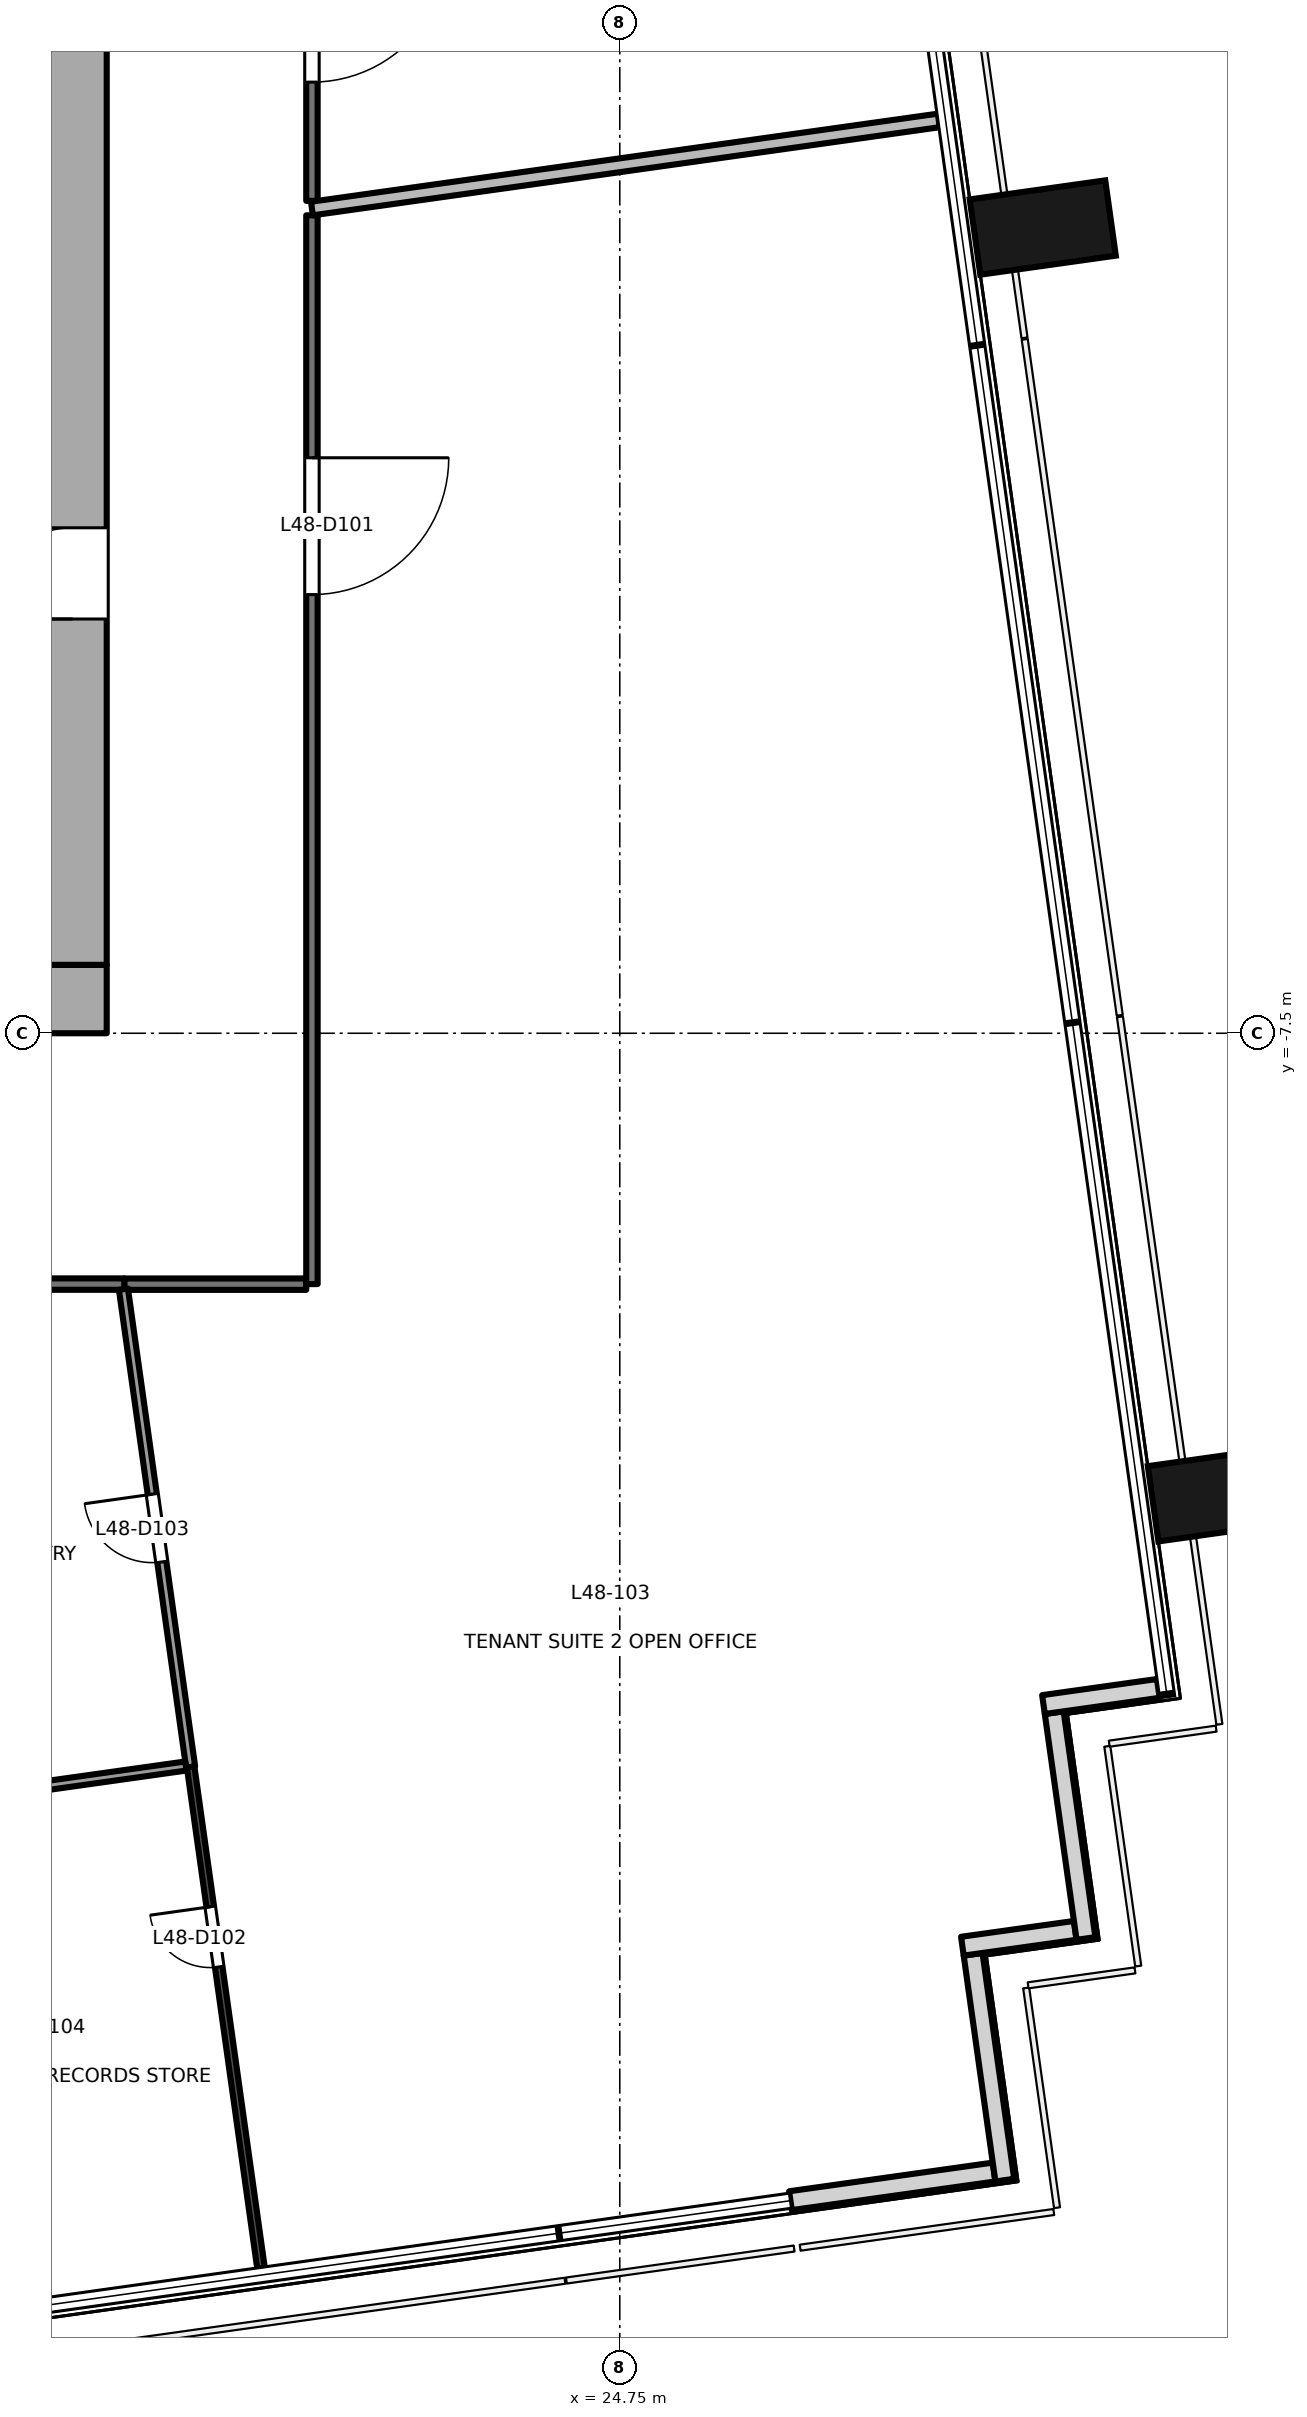
"""IFC4 building model, lengths in metres.
Left out: names, types, materials, properties, quantities, classifications, styles, units other than length and angle.
Written with IfcOpenShell. Run it as: python <this file> out.ifc"""

import sys

from ifc_helpers import new_model, si_unit, direction, frame, frame_2d, origin, origin_2d, place, context, subcontext, project, spatial, rectangle, extrude, element, fill, save


model = new_model("IFC4")
c1 = context("Model", 3, precision=1e-05, world=origin(), true_north=direction((0.0, 1.0)))
c2 = subcontext(c1, "Body", "Model", "MODEL_VIEW")
j1 = project(units=[si_unit("LENGTHUNIT", "METRE"), si_unit("PLANEANGLEUNIT", "RADIAN")], contexts=[c1])
p1 = place(None, origin())
s1 = spatial("IfcSite", under=j1, at=p1, CompositionType="ELEMENT")
p2 = place(p1, origin())
s2 = spatial("IfcBuilding", under=s1, at=p2, CompositionType="ELEMENT")
p3 = place(p2, frame((0.0, 0.0, 213.5)))
s3 = spatial("IfcBuildingStorey", under=s2, at=p3, CompositionType="ELEMENT", Elevation=213.5)
for number, where, z_axis, x_axis in (
    (1, (32.658, -13.565, -0.2), (0.0, 0.0, 1.0), (-0.139, 0.99, 0.0)),
    (2, (30.315, 3.1, -0.2), (0.0, 0.0, 1.0), (-0.139, 0.99, 0.0)),
):
    element("IfcColumn", number, at=place(p3, frame(where, z_axis=z_axis, x_axis=x_axis)), inside=s3, PredefinedType="COLUMN", context=c2, shape_type="SweptSolid", body=[
        extrude(rectangle(XDim=1.0, YDim=1.8, at=origin_2d()), origin(), (0.0, 0.0, 1.0), 3.9),
    ])
p4 = place(p3, frame((26.995, -22.859, 0.0), z_axis=(0.0, 0.0, 1.0), x_axis=(0.99024510326, 0.139336411139, 0.0)))
e3 = element("IfcWall", 3, at=p4, inside=s3, PredefinedType="SOLIDWALL", context=c2, shape_type="SweptSolid", body=[
    extrude(rectangle(XDim=2.705, YDim=0.25, at=frame_2d((1.353, 0.0))), origin(), (0.0, 0.0, 1.0), 3.7),
])
p5 = place(p3, frame((29.815, -22.588, 0.0), z_axis=(0.0, 0.0, 1.0), x_axis=(-0.138983028379, 0.9902947631, 0.0)))
e4 = element("IfcWall", 4, at=p5, inside=s3, PredefinedType="SOLIDWALL", context=c2, shape_type="SweptSolid", body=[
    extrude(rectangle(XDim=3.0, YDim=0.25, at=frame_2d((1.5, 0.0))), origin(), (0.0, 0.0, 1.0), 3.7),
])
p6 = place(p3, frame((29.257, -19.51, 0.0), z_axis=(0.0, 0.0, 1.0), x_axis=(0.990330117064, 0.138730887823, 0.0)))
e5 = element("IfcWall", 5, at=p6, inside=s3, PredefinedType="SOLIDWALL", context=c2, shape_type="SweptSolid", body=[
    extrude(rectangle(XDim=1.499, YDim=0.25, at=frame_2d((0.75, 0.0))), origin(), (0.0, 0.0, 1.0), 3.7),
])
p7 = place(p3, frame((30.883, -19.409, 0.0), z_axis=(0.0, 0.0, 1.0), x_axis=(-0.139324658755, 0.990246756855, 0.0)))
e6 = element("IfcWall", 6, at=p7, inside=s3, PredefinedType="SOLIDWALL", context=c2, shape_type="SweptSolid", body=[
    extrude(rectangle(XDim=3.0, YDim=0.25, at=frame_2d((1.5, 0.0))), origin(), (0.0, 0.0, 1.0), 3.7),
])
p8 = place(p3, frame((30.324, -16.332, 0.0), z_axis=(0.0, 0.0, 1.0), x_axis=(0.990238641016, 0.139382329723, 0.0)))
e7 = element("IfcWall", 7, at=p8, inside=s3, PredefinedType="SOLIDWALL", context=c2, shape_type="SweptSolid", body=[
    extrude(rectangle(XDim=1.526, YDim=0.25, at=frame_2d((0.763, 0.0))), origin(), (0.0, 0.0, 1.0), 3.7),
])
p9 = place(p3, frame((-18.0, -7.05, -0.2), z_axis=(0.0, 0.0, 1.0), x_axis=(1.0, 0.0, 0.0)))
e8 = element("IfcWall", 8, at=p9, inside=s3, PredefinedType="SHEAR", context=c2, shape_type="SweptSolid", body=[
    extrude(rectangle(XDim=36.0, YDim=0.9, at=frame_2d((18.0, 0.0))), origin(), (0.0, 0.0, 1.0), 3.9),
])
p10 = place(p9, frame((4.9, 0.0, 0.2)))
e9 = element("IfcOpeningElement", 9, at=p10, cuts=e8, PredefinedType="OPENING", context=c2, shape_type="SweptSolid", body=[
    extrude(rectangle(XDim=1.8, YDim=2.1, at=frame_2d((0.9, 1.05))), frame((0.0, 0.46, 0.0), z_axis=(0.0, -1.0, 0.0), x_axis=(1.0, 0.0, 0.0)), (0.0, 0.0, 1.0), 0.921),
])
p11 = place(p9, frame((16.8, 0.0, 0.2)))
e10 = element("IfcOpeningElement", 10, at=p11, cuts=e8, PredefinedType="OPENING", context=c2, shape_type="SweptSolid", body=[
    extrude(rectangle(XDim=2.4, YDim=2.1, at=frame_2d((1.2, 1.05))), frame((0.0, 0.46, 0.0), z_axis=(0.0, -1.0, 0.0), x_axis=(1.0, 0.0, 0.0)), (0.0, 0.0, 1.0), 0.921),
])
p12 = place(p9, frame((26.1, 0.0, 0.2)))
e11 = element("IfcOpeningElement", 11, at=p12, cuts=e8, PredefinedType="OPENING", context=c2, shape_type="SweptSolid", body=[
    extrude(rectangle(XDim=2.4, YDim=2.1, at=frame_2d((1.2, 1.05))), frame((0.0, 0.46, 0.0), z_axis=(0.0, -1.0, 0.0), x_axis=(1.0, 0.0, 0.0)), (0.0, 0.0, 1.0), 0.921),
])
p13 = place(p3, frame((17.55, -6.6, -0.2), z_axis=(0.0, 0.0, 1.0), x_axis=(0.0, 1.0, 0.0)))
e12 = element("IfcWall", 12, at=p13, inside=s3, PredefinedType="SHEAR", context=c2, shape_type="SweptSolid", body=[
    extrude(rectangle(XDim=13.2, YDim=0.9, at=frame_2d((6.6, 0.0))), origin(), (0.0, 0.0, 1.0), 3.9),
])
p14 = place(p13, frame((4.55, 0.0, 0.2)))
e13 = element("IfcOpeningElement", 13, at=p14, cuts=e12, PredefinedType="OPENING", context=c2, shape_type="SweptSolid", body=[
    extrude(rectangle(XDim=1.2, YDim=2.1, at=frame_2d((0.6, 1.05))), frame((0.0, 0.46, 0.0), z_axis=(0.0, -1.0, 0.0), x_axis=(1.0, 0.0, 0.0)), (0.0, 0.0, 1.0), 0.921),
])
p15 = place(p3, frame((20.625, -10.801, 0.0), z_axis=(0.0, 0.0, 1.0), x_axis=(-1.0, 0.0, 0.0)))
e14 = element("IfcWall", 14, at=p15, inside=s3, PredefinedType="PARTITIONING", context=c2, shape_type="SweptSolid", body=[
    extrude(rectangle(XDim=2.394, YDim=0.15, at=frame_2d((1.197, 0.0))), origin(), (0.0, 0.0, 1.0), 3.7),
])
p16 = place(p3, frame((20.7, 3.261, 0.0), z_axis=(0.0, 0.0, 1.0), x_axis=(0.0, -1.0, 0.0)))
e15 = element("IfcWall", 15, at=p16, inside=s3, PredefinedType="PARTITIONING", context=c2, shape_type="SweptSolid", body=[
    extrude(rectangle(XDim=14.061, YDim=0.15, at=frame_2d((7.031, 0.0))), origin(), (0.0, 0.0, 1.0), 3.1),
])
p17 = place(p16, frame((3.19, 0.0, 0.0)))
e16 = element("IfcOpeningElement", 16, at=p17, cuts=e15, PredefinedType="OPENING", context=c2, shape_type="SweptSolid", body=[
    extrude(rectangle(XDim=1.8, YDim=2.1, at=frame_2d((0.9, 1.05))), frame((0.0, 0.085, 0.0), z_axis=(0.0, -1.0, 0.0), x_axis=(1.0, 0.0, 0.0)), (0.0, 0.0, 1.0), 0.171),
])
p18 = place(p3, frame((18.231, -10.8, 0.0), z_axis=(0.0, 0.0, 1.0), x_axis=(-1.0, 0.0, 0.0)))
e17 = element("IfcWall", 17, at=p18, inside=s3, PredefinedType="PARTITIONING", context=c2, shape_type="SweptSolid", body=[
    extrude(rectangle(XDim=4.782, YDim=0.15, at=frame_2d((2.391, 0.0))), origin(), (0.0, 0.0, 1.0), 2.9),
])
p19 = place(p3, frame((20.7, 7.5, 0.0), z_axis=(0.0, 0.0, 1.0), x_axis=(0.0, -1.0, 0.0)))
e18 = element("IfcWall", 18, at=p19, inside=s3, PredefinedType="PARTITIONING", context=c2, shape_type="SweptSolid", body=[
    extrude(rectangle(XDim=4.049, YDim=0.15, at=frame_2d((2.024, 0.0))), origin(), (0.0, 0.0, 1.0), 3.15),
])
p20 = place(p19, frame((0.687, 0.0, 0.0)))
e19 = element("IfcOpeningElement", 19, at=p20, cuts=e18, PredefinedType="OPENING", context=c2, shape_type="SweptSolid", body=[
    extrude(rectangle(XDim=1.8, YDim=2.1, at=frame_2d((0.9, 1.05))), frame((0.0, 0.085, 0.0), z_axis=(0.0, -1.0, 0.0), x_axis=(1.0, 0.0, 0.0)), (0.0, 0.0, 1.0), 0.171),
])
p21 = place(p3, frame((20.03, -23.746, 0.0), z_axis=(0.0, 0.0, 1.0), x_axis=(-0.139070003418, 0.990282552683, 0.0)))
e20 = element("IfcWall", 20, at=p21, inside=s3, PredefinedType="PARTITIONING", context=c2, shape_type="SweptSolid", body=[
    extrude(rectangle(XDim=6.659, YDim=0.1, at=frame_2d((3.329, 0.0))), origin(), (0.0, 0.0, 1.0), 3.7),
])
p22 = place(p21, frame((4.001, 0.0, 0.0)))
e21 = element("IfcOpeningElement", 21, at=p22, cuts=e20, PredefinedType="OPENING", context=c2, shape_type="SweptSolid", body=[
    extrude(rectangle(XDim=0.8, YDim=2.1, at=frame_2d((0.4, 1.05))), frame((0.0, 0.061, 0.0), z_axis=(0.0, -1.0, 0.0), x_axis=(1.0, 0.0, 0.0)), (0.0, 0.0, 1.0), 0.121),
])
p23 = place(p3, frame((19.104, -17.152, 0.0), z_axis=(0.0, 0.0, 1.0), x_axis=(-0.139283120935, 0.99025260021, 0.0)))
e22 = element("IfcWall", 22, at=p23, inside=s3, PredefinedType="PARTITIONING", context=c2, shape_type="SweptSolid", body=[
    extrude(rectangle(XDim=6.347, YDim=0.12, at=frame_2d((3.173, 0.0))), origin(), (0.0, 0.0, 1.0), 3.7),
])
p24 = place(p23, frame((2.723, 0.0, 0.0)))
e23 = element("IfcOpeningElement", 23, at=p24, cuts=e22, PredefinedType="OPENING", context=c2, shape_type="SweptSolid", body=[
    extrude(rectangle(XDim=0.9, YDim=2.1, at=frame_2d((0.45, 1.05))), frame((0.0, 0.071, 0.0), z_axis=(0.0, -1.0, 0.0), x_axis=(1.0, 0.0, 0.0)), (0.0, 0.0, 1.0), 0.141),
])
p25 = place(p3, frame((20.7, 3.35, 0.0), z_axis=(0.0, 0.0, 1.0), x_axis=(0.990269965101, 0.139159606996, 0.0)))
e24 = element("IfcWall", 24, at=p25, inside=s3, PredefinedType="PARTITIONING", context=c2, shape_type="SweptSolid", body=[
    extrude(rectangle(XDim=8.328, YDim=0.18, at=frame_2d((4.164, 0.0))), origin(), (0.0, 0.0, 1.0), 3.15),
])
p26 = place(p3, frame((14.421, -17.79, 0.0), z_axis=(0.0, 0.0, 1.0), x_axis=(0.990243495755, 0.139347834982, 0.0)))
e25 = element("IfcWall", 25, at=p26, inside=s3, PredefinedType="PARTITIONING", context=c2, shape_type="SweptSolid", body=[
    extrude(rectangle(XDim=4.666, YDim=0.12, at=frame_2d((2.333, 0.0))), origin(), (0.0, 0.0, 1.0), 3.7),
])
p27 = place(p14, origin())
e26 = element("IfcDoor", 26, at=p27, inside=s3, OperationType="SINGLE_SWING_LEFT", PredefinedType="DOOR", context=c2, shape_type="SweptSolid", body=[
    extrude(rectangle(XDim=1.2, YDim=2.1, at=frame_2d((0.6, 1.05))), frame((0.0, 0.025, 0.0), z_axis=(0.0, -1.0, 0.0), x_axis=(1.0, 0.0, 0.0)), (0.0, 0.0, 1.0), 0.05),
])
fill(e13, e26)
p28 = place(p17, origin())
e27 = element("IfcDoor", 27, at=p28, inside=s3, OperationType="DOUBLE_DOOR_SINGLE_SWING", PredefinedType="DOOR", context=c2, shape_type="SweptSolid", body=[
    extrude(rectangle(XDim=1.8, YDim=2.1, at=frame_2d((0.9, 1.05))), frame((0.0, 0.025, 0.0), z_axis=(0.0, -1.0, 0.0), x_axis=(1.0, 0.0, 0.0)), (0.0, 0.0, 1.0), 0.05),
])
fill(e16, e27)
p29 = place(p22, origin())
e28 = element("IfcDoor", 28, at=p29, inside=s3, OperationType="SINGLE_SWING_RIGHT", PredefinedType="DOOR", context=c2, shape_type="SweptSolid", body=[
    extrude(rectangle(XDim=0.8, YDim=2.1, at=frame_2d((0.4, 1.05))), frame((0.0, 0.025, 0.0), z_axis=(0.0, -1.0, 0.0), x_axis=(1.0, 0.0, 0.0)), (0.0, 0.0, 1.0), 0.05),
])
fill(e21, e28)
p30 = place(p24, origin())
e29 = element("IfcDoor", 29, at=p30, inside=s3, OperationType="SINGLE_SWING_RIGHT", PredefinedType="DOOR", context=c2, shape_type="SweptSolid", body=[
    extrude(rectangle(XDim=0.9, YDim=2.1, at=frame_2d((0.45, 1.05))), frame((0.0, 0.025, 0.0), z_axis=(0.0, -1.0, 0.0), x_axis=(1.0, 0.0, 0.0)), (0.0, 0.0, 1.0), 0.05),
])
fill(e23, e29)
p31 = place(p20, origin())
e30 = element("IfcDoor", 30, at=p31, inside=s3, OperationType="DOUBLE_DOOR_SINGLE_SWING", PredefinedType="DOOR", context=c2, shape_type="SweptSolid", body=[
    extrude(rectangle(XDim=1.8, YDim=2.1, at=frame_2d((0.9, 1.05))), frame((0.0, 0.025, 0.0), z_axis=(0.0, -1.0, 0.0), x_axis=(1.0, 0.0, 0.0)), (0.0, 0.0, 1.0), 0.05),
])
fill(e19, e30)
save(model, sys.argv[1])
